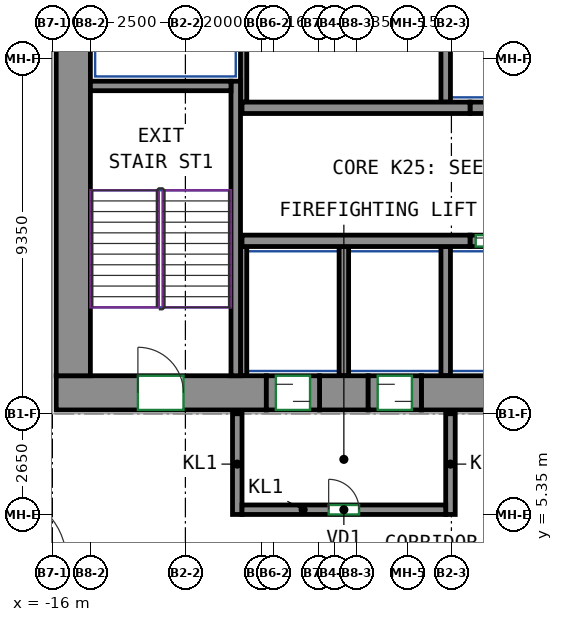
"""IFC4 building model, lengths in metres.
Left out: names, types, materials, properties, quantities, classifications, styles, units other than length and angle.
Written with IfcOpenShell. Run it as: python <this file> out.ifc"""

import sys

from ifc_helpers import new_model, si_unit, direction, frame, frame_2d, origin, place, context, subcontext, project, spatial, rectangle, extrude, source, transform, mapped, element, fill, save


model = new_model("IFC4")
c1 = context("Model", 3, precision=1e-05, world=origin(), true_north=direction((0.0, 1.0)))
c2 = subcontext(c1, "Body", "Model", "MODEL_VIEW")
j1 = project(units=[si_unit("LENGTHUNIT", "METRE"), si_unit("PLANEANGLEUNIT", "RADIAN")], contexts=[c1])
p1 = place(None, origin())
s1 = spatial("IfcSite", under=j1, at=p1, CompositionType="ELEMENT")
p2 = place(p1, origin())
s2 = spatial("IfcBuilding", under=s1, at=p2, CompositionType="ELEMENT")
p3 = place(p2, frame((0.0, 0.0, 104.6)))
s3 = spatial("IfcBuildingStorey", under=s2, at=p3, CompositionType="ELEMENT", Elevation=104.6)
m1 = source(origin(), c2, "Body", "SweptSolid", [
    extrude(rectangle(XDim=5.53, YDim=0.9, at=frame_2d((2.765, 0.0))), origin(), (0.0, 0.0, 1.0), 3.72),
])
p4 = place(p3, frame((-15.9, 8.55, 0.0), z_axis=(0.0, 0.0, 1.0), x_axis=(1.0, 0.0, 0.0)))
e1 = element("IfcWall", 1, at=p4, inside=s3, PredefinedType="SHEAR", context=c2, shape_type="MappedRepresentation", body=[
    mapped(m1, transform((0.0, 0.0, 0.0))),
])
p5 = place(p4, frame((2.15, 0.0, 0.0)))
e2 = element("IfcOpeningElement", 2, at=p5, cuts=e1, PredefinedType="OPENING", context=c2, shape_type="SweptSolid", body=[
    extrude(rectangle(XDim=1.2, YDim=2.1, at=frame_2d((0.6, 1.05))), frame((0.0, 0.46, 0.0), z_axis=(0.0, -1.0, 0.0), x_axis=(1.0, 0.0, 0.0)), (0.0, 0.0, 1.0), 0.92),
])
m2 = source(origin(), c2, "Body", "SweptSolid", [
    extrude(rectangle(XDim=1.28, YDim=0.9, at=frame_2d((0.64, 0.0))), origin(), (0.0, 0.0, 1.0), 3.72),
])
p6 = place(p3, frame((-8.97, 8.55, 0.0), z_axis=(0.0, 0.0, 1.0), x_axis=(1.0, 0.0, 0.0)))
e3 = element("IfcWall", 3, at=p6, inside=s3, PredefinedType="SHEAR", context=c2, shape_type="MappedRepresentation", body=[
    mapped(m2, transform((0.0, 0.0, 0.0))),
])
m3 = source(origin(), c2, "Body", "SweptSolid", [
    extrude(rectangle(XDim=14.18, YDim=0.9, at=frame_2d((7.09, 0.0))), origin(), (0.0, 0.0, 1.0), 3.72),
])
p7 = place(p3, frame((-6.29, 8.55, 0.0), z_axis=(0.0, 0.0, 1.0), x_axis=(1.0, 0.0, 0.0)))
e4 = element("IfcWall", 4, at=p7, inside=s3, PredefinedType="SHEAR", context=c2, shape_type="MappedRepresentation", body=[
    mapped(m3, transform((0.0, 0.0, 0.0))),
])
m4 = source(origin(), c2, "Body", "SweptSolid", [
    extrude(rectangle(XDim=12.0, YDim=0.9, at=frame_2d((6.0, 0.0))), origin(), (0.0, 0.0, 1.0), 3.72),
])
p8 = place(p3, frame((-15.45, 9.0, 0.0), z_axis=(0.0, 0.0, 1.0), x_axis=(0.0, 1.0, 0.0)))
e5 = element("IfcWall", 5, at=p8, inside=s3, PredefinedType="SHEAR", context=c2, shape_type="MappedRepresentation", body=[
    mapped(m4, transform((0.0, 0.0, 0.0))),
])
m5 = source(origin(), c2, "Body", "SweptSolid", [
    extrude(rectangle(XDim=7.75, YDim=0.25, at=frame_2d((3.875, 0.0))), origin(), (0.0, 0.0, 1.0), 3.72),
])
p9 = place(p3, frame((-11.175, 9.0, 0.0), z_axis=(0.0, 0.0, 1.0), x_axis=(0.0, 1.0, 0.0)))
e6 = element("IfcWall", 6, at=p9, inside=s3, PredefinedType="SHEAR", context=c2, shape_type="MappedRepresentation", body=[
    mapped(m5, transform((0.0, 0.0, 0.0))),
])
m6 = source(origin(), c2, "Body", "SweptSolid", [
    extrude(rectangle(XDim=3.7, YDim=0.25, at=frame_2d((1.85, 0.0))), origin(), (0.0, 0.0, 1.0), 3.72),
])
p10 = place(p3, frame((-15.0, 16.625, 0.0), z_axis=(0.0, 0.0, 1.0), x_axis=(1.0, 0.0, 0.0)))
e7 = element("IfcWall", 7, at=p10, inside=s3, PredefinedType="SHEAR", context=c2, shape_type="MappedRepresentation", body=[
    mapped(m6, transform((0.0, 0.0, 0.0))),
])
m7 = source(origin(), c2, "Body", "SweptSolid", [
    extrude(rectangle(XDim=6.0, YDim=0.3, at=frame_2d((3.0, 0.0))), origin(), (0.0, 0.0, 1.0), 3.72),
])
for number, where, z_axis, x_axis in (
    (8, (-11.01, 12.55, 0.0), (0.0, 0.0, 1.0), (1.0, 0.0, 0.0)),
    (9, (-11.01, 16.05, 0.0), (0.0, 0.0, 1.0), (1.0, 0.0, 0.0)),
):
    element("IfcWall", number, at=place(p3, frame(where, z_axis=z_axis, x_axis=x_axis)), inside=s3, PredefinedType="SHEAR", context=c2, shape_type="MappedRepresentation", body=[
        mapped(m7, transform((0.0, 0.0, 0.0))),
    ])
m8 = source(origin(), c2, "Body", "SweptSolid", [
    extrude(rectangle(XDim=1.4, YDim=0.3, at=frame_2d((0.7, 0.0))), origin(), (0.0, 0.0, 1.0), 3.72),
])
p11 = place(p3, frame((-5.01, 12.55, 0.0), z_axis=(0.0, 0.0, 1.0), x_axis=(1.0, 0.0, 0.0)))
e10 = element("IfcWall", 10, at=p11, inside=s3, PredefinedType="PARTITIONING", context=c2, shape_type="MappedRepresentation", body=[
    mapped(m8, transform((0.0, 0.0, 0.0))),
])
p12 = place(p11, frame((0.15, 0.0, 0.0)))
e11 = element("IfcOpeningElement", 11, at=p12, cuts=e10, PredefinedType="OPENING", context=c2, shape_type="SweptSolid", body=[
    extrude(rectangle(XDim=1.1, YDim=2.1, at=frame_2d((0.55, 1.05))), frame((0.0, 0.16, 0.0), z_axis=(0.0, -1.0, 0.0), x_axis=(1.0, 0.0, 0.0)), (0.0, 0.0, 1.0), 0.32),
])
p13 = place(p3, frame((-5.01, 16.05, 0.0), z_axis=(0.0, 0.0, 1.0), x_axis=(1.0, 0.0, 0.0)))
e12 = element("IfcWall", 12, at=p13, inside=s3, PredefinedType="PARTITIONING", context=c2, shape_type="MappedRepresentation", body=[
    mapped(m8, transform((0.0, 0.0, 0.0))),
])
m9 = source(origin(), c2, "Body", "SweptSolid", [
    extrude(rectangle(XDim=2.65, YDim=0.25, at=frame_2d((1.325, 0.0))), origin(), (0.0, 0.0, 1.0), 3.72),
])
for number, where, z_axis, x_axis in (
    (13, (-11.135, 5.35, 0.0), (0.0, 0.0, 1.0), (0.0, 1.0, 0.0)),
    (14, (-5.525, 5.35, 0.0), (0.0, 0.0, 1.0), (0.0, 1.0, 0.0)),
):
    element("IfcWall", number, at=place(p3, frame(where, z_axis=z_axis, x_axis=x_axis)), inside=s3, PredefinedType="PARTITIONING", context=c2, shape_type="MappedRepresentation", body=[
        mapped(m9, transform((0.0, 0.0, 0.0))),
    ])
m10 = source(origin(), c2, "Body", "SweptSolid", [
    extrude(rectangle(XDim=5.36, YDim=0.25, at=frame_2d((2.68, 0.0))), origin(), (0.0, 0.0, 1.0), 3.72),
])
p14 = place(p3, frame((-11.01, 5.475, 0.0), z_axis=(0.0, 0.0, 1.0), x_axis=(1.0, 0.0, 0.0)))
e15 = element("IfcWall", 15, at=p14, inside=s3, PredefinedType="PARTITIONING", context=c2, shape_type="MappedRepresentation", body=[
    mapped(m10, transform((0.0, 0.0, 0.0))),
])
p15 = place(p14, frame((2.28, 0.0, 0.0)))
e16 = element("IfcOpeningElement", 16, at=p15, cuts=e15, PredefinedType="OPENING", context=c2, shape_type="SweptSolid", body=[
    extrude(rectangle(XDim=0.8, YDim=2.0, at=frame_2d((0.4, 1.0))), frame((0.0, 0.135, 0.0), z_axis=(0.0, -1.0, 0.0), x_axis=(1.0, 0.0, 0.0)), (0.0, 0.0, 1.0), 0.27),
])
m11 = source(origin(), c2, "Body", "SweptSolid", [
    extrude(rectangle(XDim=4.8, YDim=0.165, at=frame_2d((2.4, 0.0))), origin(), (0.0, 0.0, 1.0), 3.72),
])
p16 = place(p3, frame((-10.968, 16.2, 0.0), z_axis=(0.0, 0.0, 1.0), x_axis=(0.0, 1.0, 0.0)))
e17 = element("IfcWall", 17, at=p16, inside=s3, PredefinedType="PARTITIONING", context=c2, shape_type="MappedRepresentation", body=[
    mapped(m11, transform((0.0, 0.0, 0.0))),
])
m12 = source(origin(), c2, "Body", "SweptSolid", [
    extrude(rectangle(XDim=3.275, YDim=0.25, at=frame_2d((1.638, 0.0))), origin(), (0.0, 0.0, 1.0), 3.72),
])
p17 = place(p3, frame((-5.65, 16.2, 0.0), z_axis=(0.0, 0.0, 1.0), x_axis=(0.0, 1.0, 0.0)))
e18 = element("IfcWall", 18, at=p17, inside=s3, PredefinedType="PARTITIONING", context=c2, shape_type="MappedRepresentation", body=[
    mapped(m12, transform((0.0, 0.0, 0.0))),
])
m13 = source(origin(), c2, "Body", "SweptSolid", [
    extrude(rectangle(XDim=3.4, YDim=0.165, at=frame_2d((1.7, 0.0))), origin(), (0.0, 0.0, 1.0), 3.72),
])
p18 = place(p3, frame((-10.968, 9.0, 0.0), z_axis=(0.0, 0.0, 1.0), x_axis=(0.0, 1.0, 0.0)))
e19 = element("IfcWall", 19, at=p18, inside=s3, PredefinedType="PARTITIONING", context=c2, shape_type="MappedRepresentation", body=[
    mapped(m13, transform((0.0, 0.0, 0.0))),
])
m14 = source(origin(), c2, "Body", "SweptSolid", [
    extrude(rectangle(XDim=3.4, YDim=0.25, at=frame_2d((1.7, 0.0))), origin(), (0.0, 0.0, 1.0), 3.72),
])
for number, where, z_axis, x_axis in (
    (20, (-5.65, 9.0, 0.0), (0.0, 0.0, 1.0), (0.0, 1.0, 0.0)),
    (21, (-8.33, 9.0, 0.0), (0.0, 0.0, 1.0), (0.0, 1.0, 0.0)),
):
    element("IfcWall", number, at=place(p3, frame(where, z_axis=z_axis, x_axis=x_axis)), inside=s3, PredefinedType="PARTITIONING", context=c2, shape_type="MappedRepresentation", body=[
        mapped(m14, transform((0.0, 0.0, 0.0))),
    ])
m15 = source(origin(), c2, "Body", "SweptSolid", [
    extrude(rectangle(XDim=1.4, YDim=0.9, at=frame_2d((0.7, 0.0))), origin(), (0.0, 0.0, 1.0), 2.7),
])
p19 = place(p3, frame((-10.37, 8.55, 0.0), z_axis=(0.0, 0.0, 1.0), x_axis=(1.0, 0.0, 0.0)))
e22 = element("IfcWall", 22, at=p19, inside=s3, PredefinedType="PARTITIONING", context=c2, shape_type="MappedRepresentation", body=[
    mapped(m15, transform((0.0, 0.0, 0.0))),
])
p20 = place(p19, frame((0.25, 0.0, 0.0)))
e23 = element("IfcOpeningElement", 23, at=p20, cuts=e22, PredefinedType="OPENING", context=c2, shape_type="SweptSolid", body=[
    extrude(rectangle(XDim=0.9, YDim=2.1, at=frame_2d((0.45, 1.05))), frame((0.0, 0.46, 0.0), z_axis=(0.0, -1.0, 0.0), x_axis=(1.0, 0.0, 0.0)), (0.0, 0.0, 1.0), 0.92),
])
m16 = source(origin(), c2, "Body", "SweptSolid", [
    extrude(rectangle(XDim=1.4, YDim=0.9, at=frame_2d((0.7, 0.0))), origin(), (0.0, 0.0, 1.0), 2.7),
])
p21 = place(p3, frame((-7.69, 8.55, 0.0), z_axis=(0.0, 0.0, 1.0), x_axis=(1.0, 0.0, 0.0)))
e24 = element("IfcWall", 24, at=p21, inside=s3, PredefinedType="PARTITIONING", context=c2, shape_type="MappedRepresentation", body=[
    mapped(m16, transform((0.0, 0.0, 0.0))),
])
p22 = place(p21, frame((0.25, 0.0, 0.0)))
e25 = element("IfcOpeningElement", 25, at=p22, cuts=e24, PredefinedType="OPENING", context=c2, shape_type="SweptSolid", body=[
    extrude(rectangle(XDim=0.9, YDim=2.1, at=frame_2d((0.45, 1.05))), frame((0.0, 0.46, 0.0), z_axis=(0.0, -1.0, 0.0), x_axis=(1.0, 0.0, 0.0)), (0.0, 0.0, 1.0), 0.92),
])
p23 = place(p15, origin())
e26 = element("IfcDoor", 26, at=p23, inside=s3, OperationType="SINGLE_SWING_LEFT", PredefinedType="DOOR", context=c2, shape_type="SweptSolid", body=[
    extrude(rectangle(XDim=0.8, YDim=2.0, at=frame_2d((0.4, 1.0))), frame((0.0, 0.025, 0.0), z_axis=(0.0, -1.0, 0.0), x_axis=(1.0, 0.0, 0.0)), (0.0, 0.0, 1.0), 0.05),
])
fill(e16, e26)
p24 = place(p20, origin())
e27 = element("IfcDoor", 27, at=p24, inside=s3, OperationType="SLIDING_TO_LEFT", PredefinedType="DOOR", context=c2, shape_type="SweptSolid", body=[
    extrude(rectangle(XDim=0.9, YDim=2.1, at=frame_2d((0.45, 1.05))), frame((0.0, 0.355, 0.0), z_axis=(0.0, -1.0, 0.0), x_axis=(1.0, 0.0, 0.0)), (0.0, 0.0, 1.0), 0.05),
])
fill(e23, e27)
p25 = place(p22, origin())
e28 = element("IfcDoor", 28, at=p25, inside=s3, OperationType="SLIDING_TO_RIGHT", PredefinedType="DOOR", context=c2, shape_type="SweptSolid", body=[
    extrude(rectangle(XDim=0.9, YDim=2.1, at=frame_2d((0.45, 1.05))), frame((0.0, 0.355, 0.0), z_axis=(0.0, -1.0, 0.0), x_axis=(1.0, 0.0, 0.0)), (0.0, 0.0, 1.0), 0.05),
])
fill(e25, e28)
p26 = place(p12, origin())
e29 = element("IfcDoor", 29, at=p26, inside=s3, OperationType="DOUBLE_DOOR_SLIDING", PredefinedType="DOOR", context=c2, shape_type="SweptSolid", body=[
    extrude(rectangle(XDim=1.1, YDim=2.1, at=frame_2d((0.55, 1.05))), frame((0.0, 0.025, 0.0), z_axis=(0.0, -1.0, 0.0), x_axis=(1.0, 0.0, 0.0)), (0.0, 0.0, 1.0), 0.05),
])
fill(e11, e29)
p27 = place(p5, origin())
e30 = element("IfcDoor", 30, at=p27, inside=s3, OperationType="DOUBLE_DOOR_SINGLE_SWING", PredefinedType="DOOR", context=c2, shape_type="SweptSolid", body=[
    extrude(rectangle(XDim=1.2, YDim=2.1, at=frame_2d((0.6, 1.05))), frame((0.0, 0.355, 0.0), z_axis=(0.0, -1.0, 0.0), x_axis=(1.0, 0.0, 0.0)), (0.0, 0.0, 1.0), 0.05),
])
fill(e2, e30)
save(model, sys.argv[1])
